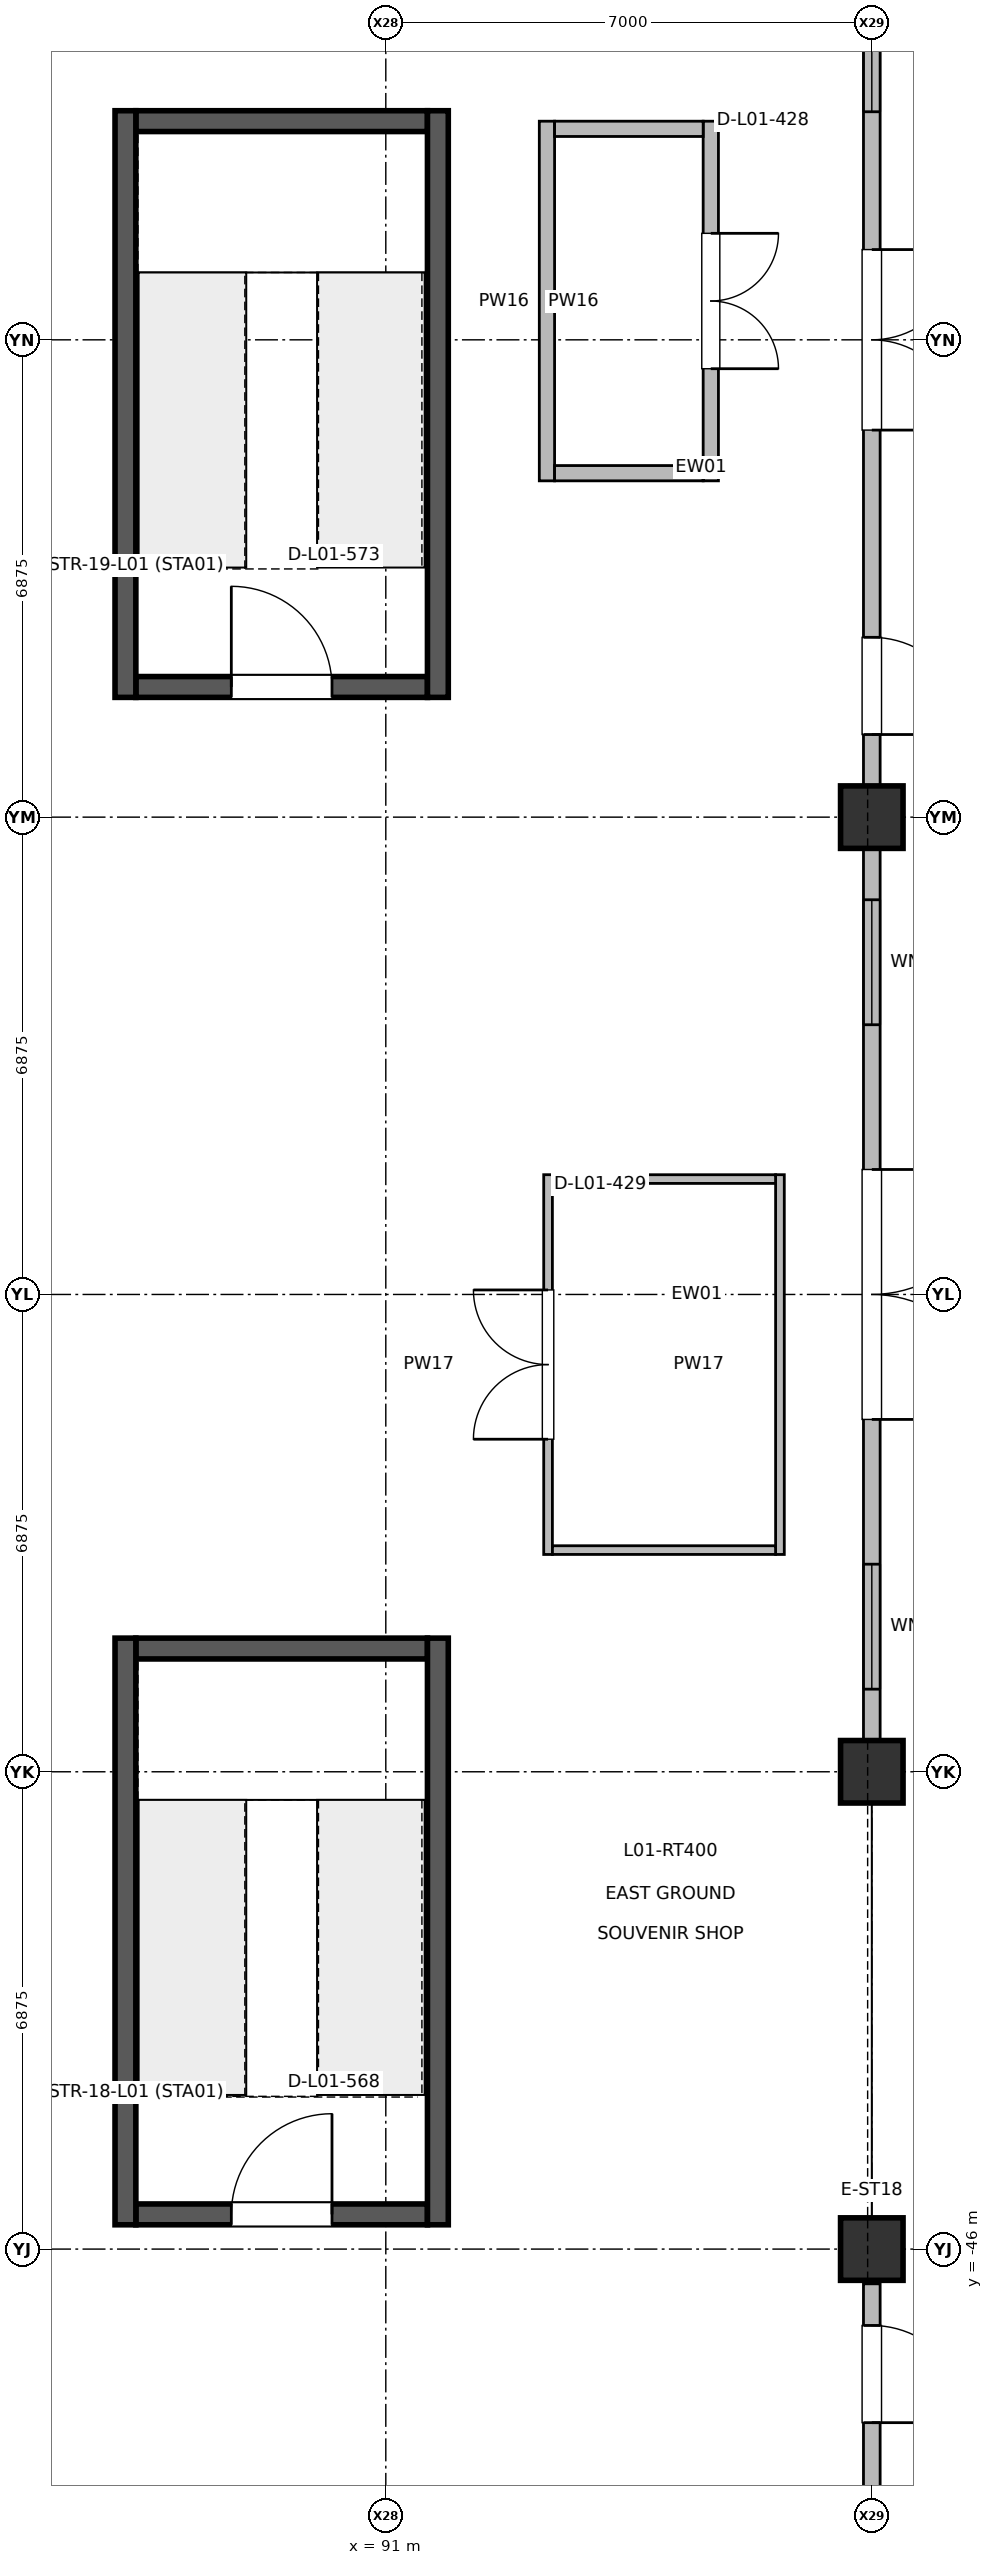
"""IFC4 building model, lengths in metres.
Left out: names, types, materials, properties, quantities, classifications, styles, units other than length and angle.
Written with IfcOpenShell. Run it as: python <this file> out.ifc"""

import sys

from ifc_helpers import new_model, si_unit, direction, frame, frame_2d, origin, origin_2d, place, context, subcontext, project, spatial, rectangle, circle, extrude, element, fill, save


model = new_model("IFC4")
c1 = context("Model", 3, precision=1e-05, world=origin(), true_north=direction((0.0, 1.0)))
c2 = subcontext(c1, "Body", "Model", "MODEL_VIEW")
j1 = project(units=[si_unit("LENGTHUNIT", "METRE"), si_unit("PLANEANGLEUNIT", "RADIAN")], contexts=[c1])
p1 = place(None, origin())
s1 = spatial("IfcSite", under=j1, at=p1, CompositionType="ELEMENT")
p2 = place(p1, origin())
s2 = spatial("IfcBuilding", under=s1, at=p2, CompositionType="ELEMENT")
p3 = place(p2, origin())
s3 = spatial("IfcBuildingStorey", under=s2, at=p3, CompositionType="ELEMENT", Elevation=0.0)
for number, where, z_axis, x_axis in (
    (1, (98.0, -46.0, 0.0), (0.0, 0.0, 1.0), (1.0, 0.0, 0.0)),
    (2, (98.0, -39.125, 0.0), (0.0, 0.0, 1.0), (1.0, 0.0, 0.0)),
    (3, (98.0, -25.375, 0.0), (0.0, 0.0, 1.0), (1.0, 0.0, 0.0)),
):
    element("IfcColumn", number, at=place(p3, frame(where, z_axis=z_axis, x_axis=x_axis)), inside=s3, PredefinedType="COLUMN", context=c2, shape_type="SweptSolid", body=[
        extrude(circle(Radius=0.45, at=origin_2d()), origin(), (0.0, 0.0, 1.0), 5.998),
    ])
p4 = place(p3, frame((98.0, -25.815, 0.0), z_axis=(0.0, 0.0, 1.0), x_axis=(0.0, -1.0, 0.0)))
e4 = element("IfcWall", 4, at=p4, inside=s3, PredefinedType="SOLIDWALL", context=c2, shape_type="SweptSolid", body=[
    extrude(rectangle(XDim=12.87, YDim=0.24, at=frame_2d((6.435, 0.0))), origin(), (0.0, 0.0, 1.0), 3.925),
])
p5 = place(p4, frame((4.635, 0.0, 0.0)))
e5 = element("IfcOpeningElement", 5, at=p5, cuts=e4, PredefinedType="OPENING", context=c2, shape_type="SweptSolid", body=[
    extrude(rectangle(XDim=3.6, YDim=2.75, at=frame_2d((1.8, 1.375))), frame((0.0, 0.13, 0.0), z_axis=(0.0, -1.0, 0.0), x_axis=(1.0, 0.0, 0.0)), (0.0, 0.0, 1.0), 0.26),
])
p6 = place(p4, frame((0.75, 0.0, 1.0)))
e6 = element("IfcOpeningElement", 6, at=p6, cuts=e4, PredefinedType="OPENING", context=c2, shape_type="SweptSolid", body=[
    extrude(rectangle(XDim=1.8, YDim=1.95, at=frame_2d((0.9, 0.975))), frame((0.0, 0.13, 0.0), z_axis=(0.0, -1.0, 0.0), x_axis=(1.0, 0.0, 0.0)), (0.0, 0.0, 1.0), 0.26),
])
p7 = place(p4, frame((10.32, 0.0, 1.0)))
e7 = element("IfcOpeningElement", 7, at=p7, cuts=e4, PredefinedType="OPENING", context=c2, shape_type="SweptSolid", body=[
    extrude(rectangle(XDim=1.8, YDim=1.95, at=frame_2d((0.9, 0.975))), frame((0.0, 0.13, 0.0), z_axis=(0.0, -1.0, 0.0), x_axis=(1.0, 0.0, 0.0)), (0.0, 0.0, 1.0), 0.26),
])
p8 = place(p3, frame((98.0, -12.065, 0.0), z_axis=(0.0, 0.0, 1.0), x_axis=(0.0, -1.0, 0.0)))
e8 = element("IfcWall", 8, at=p8, inside=s3, PredefinedType="SOLIDWALL", context=c2, shape_type="SweptSolid", body=[
    extrude(rectangle(XDim=12.87, YDim=0.24, at=frame_2d((6.435, 0.0))), origin(), (0.0, 0.0, 1.0), 4.625),
])
p9 = place(p8, frame((5.135, 0.0, 0.0)))
e9 = element("IfcOpeningElement", 9, at=p9, cuts=e8, PredefinedType="OPENING", context=c2, shape_type="SweptSolid", body=[
    extrude(rectangle(XDim=2.6, YDim=2.55, at=frame_2d((1.3, 1.275))), frame((0.0, 0.13, 0.0), z_axis=(0.0, -1.0, 0.0), x_axis=(1.0, 0.0, 0.0)), (0.0, 0.0, 1.0), 0.26),
])
p10 = place(p8, frame((0.75, 0.0, 1.0)))
e10 = element("IfcOpeningElement", 10, at=p10, cuts=e8, PredefinedType="OPENING", context=c2, shape_type="SweptSolid", body=[
    extrude(rectangle(XDim=2.4, YDim=2.05, at=frame_2d((1.2, 1.025))), frame((0.0, 0.13, 0.0), z_axis=(0.0, -1.0, 0.0), x_axis=(1.0, 0.0, 0.0)), (0.0, 0.0, 1.0), 0.26),
])
p11 = place(p8, frame((10.72, 0.0, 0.0)))
e11 = element("IfcOpeningElement", 11, at=p11, cuts=e8, PredefinedType="OPENING", context=c2, shape_type="SweptSolid", body=[
    extrude(rectangle(XDim=1.4, YDim=2.2, at=frame_2d((0.7, 1.1))), frame((0.0, 0.13, 0.0), z_axis=(0.0, -1.0, 0.0), x_axis=(1.0, 0.0, 0.0)), (0.0, 0.0, 1.0), 0.26),
])
p12 = place(p3, frame((98.0, -46.5, 0.0), z_axis=(0.0, 0.0, 1.0), x_axis=(0.0, -1.0, 0.0)))
e12 = element("IfcWall", 12, at=p12, inside=s3, PredefinedType="SOLIDWALL", context=c2, shape_type="SweptSolid", body=[
    extrude(rectangle(XDim=5.3, YDim=0.24, at=frame_2d((2.65, 0.0))), origin(), (0.0, 0.0, 1.0), 4.625),
])
p13 = place(p12, frame((0.6, 0.0, 0.0)))
e13 = element("IfcOpeningElement", 13, at=p13, cuts=e12, PredefinedType="OPENING", context=c2, shape_type="SweptSolid", body=[
    extrude(rectangle(XDim=1.4, YDim=2.2, at=frame_2d((0.7, 1.1))), frame((0.0, 0.13, 0.0), z_axis=(0.0, -1.0, 0.0), x_axis=(1.0, 0.0, 0.0)), (0.0, 0.0, 1.0), 0.26),
])
p14 = place(p3, frame((95.681, -15.351, 0.0), z_axis=(0.0, 0.0, 1.0), x_axis=(0.0, -1.0, 0.0)))
e14 = element("IfcWall", 14, at=p14, inside=s3, PredefinedType="PARTITIONING", context=c2, shape_type="SweptSolid", body=[
    extrude(rectangle(XDim=5.18, YDim=0.22, at=frame_2d((2.59, 0.0))), origin(), (0.0, 0.0, 1.0), 5.02),
])
p15 = place(p14, frame((1.615, 0.0, 0.0)))
e15 = element("IfcOpeningElement", 15, at=p15, cuts=e14, PredefinedType="OPENING", context=c2, shape_type="SweptSolid", body=[
    extrude(rectangle(XDim=1.95, YDim=2.35, at=frame_2d((0.975, 1.175))), frame((0.0, 0.12, 0.0), z_axis=(0.0, -1.0, 0.0), x_axis=(1.0, 0.0, 0.0)), (0.0, 0.0, 1.0), 0.24),
])
p16 = place(p3, frame((93.337, -35.995, 0.0), z_axis=(0.0, 0.0, 1.0), x_axis=(0.0, 1.0, 0.0)))
e16 = element("IfcWall", 16, at=p16, inside=s3, PredefinedType="PARTITIONING", context=c2, shape_type="SweptSolid", body=[
    extrude(rectangle(XDim=5.47, YDim=0.125, at=frame_2d((2.735, 0.0))), origin(), (0.0, 0.0, 1.0), 5.02),
])
p17 = place(p16, frame((1.66, 0.0, 0.0)))
e17 = element("IfcOpeningElement", 17, at=p17, cuts=e16, PredefinedType="OPENING", context=c2, shape_type="SweptSolid", body=[
    extrude(rectangle(XDim=2.15, YDim=2.45, at=frame_2d((1.075, 1.225))), frame((0.0, 0.073, 0.0), z_axis=(0.0, -1.0, 0.0), x_axis=(1.0, 0.0, 0.0)), (0.0, 0.0, 1.0), 0.145),
])
p18 = place(p3, frame((93.321, -20.531, 0.0), z_axis=(0.0, 0.0, 1.0), x_axis=(0.0, 1.0, 0.0)))
e18 = element("IfcWall", 18, at=p18, inside=s3, PredefinedType="PARTITIONING", context=c2, shape_type="SweptSolid", body=[
    extrude(rectangle(XDim=5.18, YDim=0.22, at=frame_2d((2.59, 0.0))), origin(), (0.0, 0.0, 1.0), 5.02),
])
for number, where, z_axis, x_axis in (
    (19, (93.431, -20.421, 0.0), (0.0, 0.0, 1.0), (1.0, 0.0, 0.0)),
    (20, (93.431, -15.461, 0.0), (0.0, 0.0, 1.0), (1.0, 0.0, 0.0)),
):
    element("IfcWall", number, at=place(p3, frame(where, z_axis=z_axis, x_axis=x_axis)), inside=s3, PredefinedType="PARTITIONING", context=c2, shape_type="SweptSolid", body=[
        extrude(rectangle(XDim=2.14, YDim=0.22, at=frame_2d((1.07, 0.0))), origin(), (0.0, 0.0, 1.0), 5.02),
    ])
p19 = place(p3, frame((96.677, -35.995, 0.0), z_axis=(0.0, 0.0, 1.0), x_axis=(0.0, 1.0, 0.0)))
e21 = element("IfcWall", 21, at=p19, inside=s3, PredefinedType="PARTITIONING", context=c2, shape_type="SweptSolid", body=[
    extrude(rectangle(XDim=5.47, YDim=0.125, at=frame_2d((2.735, 0.0))), origin(), (0.0, 0.0, 1.0), 5.02),
])
for number, where, z_axis, x_axis in (
    (22, (93.4, -35.932, 0.0), (0.0, 0.0, 1.0), (1.0, 0.0, 0.0)),
    (23, (93.4, -30.588, 0.0), (0.0, 0.0, 1.0), (1.0, 0.0, 0.0)),
):
    element("IfcWall", number, at=place(p3, frame(where, z_axis=z_axis, x_axis=x_axis)), inside=s3, PredefinedType="PARTITIONING", context=c2, shape_type="SweptSolid", body=[
        extrude(rectangle(XDim=3.214, YDim=0.125, at=frame_2d((1.607, 0.0))), origin(), (0.0, 0.0, 1.0), 5.02),
    ])
p20 = place(p3, frame((87.4, -45.5, 0.0), z_axis=(0.0, 0.0, 1.0), x_axis=(1.0, 0.0, 0.0)))
e24 = element("IfcWall", 24, at=p20, inside=s3, PredefinedType="SHEAR", context=c2, shape_type="SweptSolid", body=[
    extrude(rectangle(XDim=4.2, YDim=0.3, at=frame_2d((2.1, 0.0))), origin(), (0.0, 0.0, 1.0), 5.75),
])
p21 = place(p20, frame((1.375, 0.0, 0.0)))
e25 = element("IfcOpeningElement", 25, at=p21, cuts=e24, PredefinedType="OPENING", context=c2, shape_type="SweptSolid", body=[
    extrude(rectangle(XDim=1.45, YDim=2.2, at=frame_2d((0.725, 1.1))), frame((0.0, 0.16, 0.0), z_axis=(0.0, -1.0, 0.0), x_axis=(1.0, 0.0, 0.0)), (0.0, 0.0, 1.0), 0.32),
])
p22 = place(p3, frame((87.4, -37.35, 0.0), z_axis=(0.0, 0.0, 1.0), x_axis=(1.0, 0.0, 0.0)))
e26 = element("IfcWall", 26, at=p22, inside=s3, PredefinedType="SHEAR", context=c2, shape_type="SweptSolid", body=[
    extrude(rectangle(XDim=4.2, YDim=0.3, at=frame_2d((2.1, 0.0))), origin(), (0.0, 0.0, 1.0), 5.75),
])
for number, where, z_axis, x_axis in (
    (27, (87.25, -45.65, 0.0), (0.0, 0.0, 1.0), (0.0, 1.0, 0.0)),
    (28, (91.75, -45.65, 0.0), (0.0, 0.0, 1.0), (0.0, 1.0, 0.0)),
):
    element("IfcWall", number, at=place(p3, frame(where, z_axis=z_axis, x_axis=x_axis)), inside=s3, PredefinedType="SHEAR", context=c2, shape_type="SweptSolid", body=[
        extrude(rectangle(XDim=8.45, YDim=0.3, at=frame_2d((4.225, 0.0))), origin(), (0.0, 0.0, 1.0), 5.75),
    ])
p23 = place(p3, frame((87.4, -23.5, 0.0), z_axis=(0.0, 0.0, 1.0), x_axis=(1.0, 0.0, 0.0)))
e29 = element("IfcWall", 29, at=p23, inside=s3, PredefinedType="SHEAR", context=c2, shape_type="SweptSolid", body=[
    extrude(rectangle(XDim=4.2, YDim=0.3, at=frame_2d((2.1, 0.0))), origin(), (0.0, 0.0, 1.0), 5.75),
])
p24 = place(p23, frame((1.375, 0.0, 0.0)))
e30 = element("IfcOpeningElement", 30, at=p24, cuts=e29, PredefinedType="OPENING", context=c2, shape_type="SweptSolid", body=[
    extrude(rectangle(XDim=1.45, YDim=2.2, at=frame_2d((0.725, 1.1))), frame((0.0, 0.16, 0.0), z_axis=(0.0, -1.0, 0.0), x_axis=(1.0, 0.0, 0.0)), (0.0, 0.0, 1.0), 0.32),
])
p25 = place(p3, frame((87.4, -15.35, 0.0), z_axis=(0.0, 0.0, 1.0), x_axis=(1.0, 0.0, 0.0)))
e31 = element("IfcWall", 31, at=p25, inside=s3, PredefinedType="SHEAR", context=c2, shape_type="SweptSolid", body=[
    extrude(rectangle(XDim=4.2, YDim=0.3, at=frame_2d((2.1, 0.0))), origin(), (0.0, 0.0, 1.0), 5.75),
])
for number, where, z_axis, x_axis in (
    (32, (87.25, -23.65, 0.0), (0.0, 0.0, 1.0), (0.0, 1.0, 0.0)),
    (33, (91.75, -23.65, 0.0), (0.0, 0.0, 1.0), (0.0, 1.0, 0.0)),
):
    element("IfcWall", number, at=place(p3, frame(where, z_axis=z_axis, x_axis=x_axis)), inside=s3, PredefinedType="SHEAR", context=c2, shape_type="SweptSolid", body=[
        extrude(rectangle(XDim=8.45, YDim=0.3, at=frame_2d((4.225, 0.0))), origin(), (0.0, 0.0, 1.0), 5.75),
    ])
p26 = place(p5, origin())
e34 = element("IfcDoor", 34, at=p26, inside=s3, OperationType="DOUBLE_DOOR_SINGLE_SWING", PredefinedType="DOOR", context=c2, shape_type="SweptSolid", body=[
    extrude(rectangle(XDim=3.6, YDim=2.75, at=frame_2d((1.8, 1.375))), frame((0.0, 0.025, 0.0), z_axis=(0.0, -1.0, 0.0), x_axis=(1.0, 0.0, 0.0)), (0.0, 0.0, 1.0), 0.05),
])
fill(e5, e34)
p27 = place(p6, origin())
e35 = element("IfcWindow", 35, at=p27, inside=s3, PartitioningType="SINGLE_PANEL", PredefinedType="WINDOW", context=c2, shape_type="SweptSolid", body=[
    extrude(rectangle(XDim=1.8, YDim=1.95, at=frame_2d((0.9, 0.975))), frame((0.0, 0.03, 0.0), z_axis=(0.0, -1.0, 0.0), x_axis=(1.0, 0.0, 0.0)), (0.0, 0.0, 1.0), 0.06),
])
fill(e6, e35)
p28 = place(p7, origin())
e36 = element("IfcWindow", 36, at=p28, inside=s3, PartitioningType="SINGLE_PANEL", PredefinedType="WINDOW", context=c2, shape_type="SweptSolid", body=[
    extrude(rectangle(XDim=1.8, YDim=1.95, at=frame_2d((0.9, 0.975))), frame((0.0, 0.03, 0.0), z_axis=(0.0, -1.0, 0.0), x_axis=(1.0, 0.0, 0.0)), (0.0, 0.0, 1.0), 0.06),
])
fill(e7, e36)
p29 = place(p9, origin())
e37 = element("IfcDoor", 37, at=p29, inside=s3, OperationType="DOUBLE_DOOR_SINGLE_SWING", PredefinedType="DOOR", context=c2, shape_type="SweptSolid", body=[
    extrude(rectangle(XDim=2.6, YDim=2.55, at=frame_2d((1.3, 1.275))), frame((0.0, 0.025, 0.0), z_axis=(0.0, -1.0, 0.0), x_axis=(1.0, 0.0, 0.0)), (0.0, 0.0, 1.0), 0.05),
])
fill(e9, e37)
p30 = place(p10, origin())
e38 = element("IfcWindow", 38, at=p30, inside=s3, PartitioningType="SINGLE_PANEL", PredefinedType="WINDOW", context=c2, shape_type="SweptSolid", body=[
    extrude(rectangle(XDim=2.4, YDim=2.05, at=frame_2d((1.2, 1.025))), frame((0.0, 0.03, 0.0), z_axis=(0.0, -1.0, 0.0), x_axis=(1.0, 0.0, 0.0)), (0.0, 0.0, 1.0), 0.06),
])
fill(e10, e38)
p31 = place(p11, origin())
e39 = element("IfcDoor", 39, at=p31, inside=s3, OperationType="SINGLE_SWING_RIGHT", PredefinedType="DOOR", context=c2, shape_type="SweptSolid", body=[
    extrude(rectangle(XDim=1.4, YDim=2.2, at=frame_2d((0.7, 1.1))), frame((0.0, 0.025, 0.0), z_axis=(0.0, -1.0, 0.0), x_axis=(1.0, 0.0, 0.0)), (0.0, 0.0, 1.0), 0.05),
])
fill(e11, e39)
p32 = place(p13, origin())
e40 = element("IfcDoor", 40, at=p32, inside=s3, OperationType="SINGLE_SWING_RIGHT", PredefinedType="DOOR", context=c2, shape_type="SweptSolid", body=[
    extrude(rectangle(XDim=1.4, YDim=2.2, at=frame_2d((0.7, 1.1))), frame((0.0, 0.025, 0.0), z_axis=(0.0, -1.0, 0.0), x_axis=(1.0, 0.0, 0.0)), (0.0, 0.0, 1.0), 0.05),
])
fill(e13, e40)
p33 = place(p15, origin())
e41 = element("IfcDoor", 41, at=p33, inside=s3, OperationType="DOUBLE_DOOR_SINGLE_SWING", PredefinedType="DOOR", context=c2, shape_type="SweptSolid", body=[
    extrude(rectangle(XDim=1.95, YDim=2.35, at=frame_2d((0.975, 1.175))), frame((0.0, 0.025, 0.0), z_axis=(0.0, -1.0, 0.0), x_axis=(1.0, 0.0, 0.0)), (0.0, 0.0, 1.0), 0.05),
])
fill(e15, e41)
p34 = place(p17, origin())
e42 = element("IfcDoor", 42, at=p34, inside=s3, OperationType="DOUBLE_DOOR_SINGLE_SWING", PredefinedType="DOOR", context=c2, shape_type="SweptSolid", body=[
    extrude(rectangle(XDim=2.15, YDim=2.45, at=frame_2d((1.075, 1.225))), frame((0.0, 0.025, 0.0), z_axis=(0.0, -1.0, 0.0), x_axis=(1.0, 0.0, 0.0)), (0.0, 0.0, 1.0), 0.05),
])
fill(e17, e42)
p35 = place(p21, origin())
e43 = element("IfcDoor", 43, at=p35, inside=s3, OperationType="SINGLE_SWING_RIGHT", PredefinedType="DOOR", context=c2, shape_type="SweptSolid", body=[
    extrude(rectangle(XDim=1.45, YDim=2.2, at=frame_2d((0.725, 1.1))), frame((0.0, 0.025, 0.0), z_axis=(0.0, -1.0, 0.0), x_axis=(1.0, 0.0, 0.0)), (0.0, 0.0, 1.0), 0.05),
])
fill(e25, e43)
p36 = place(p24, origin())
e44 = element("IfcDoor", 44, at=p36, inside=s3, OperationType="SINGLE_SWING_LEFT", PredefinedType="DOOR", context=c2, shape_type="SweptSolid", body=[
    extrude(rectangle(XDim=1.45, YDim=2.2, at=frame_2d((0.725, 1.1))), frame((0.0, 0.025, 0.0), z_axis=(0.0, -1.0, 0.0), x_axis=(1.0, 0.0, 0.0)), (0.0, 0.0, 1.0), 0.05),
])
fill(e30, e44)
save(model, sys.argv[1])
